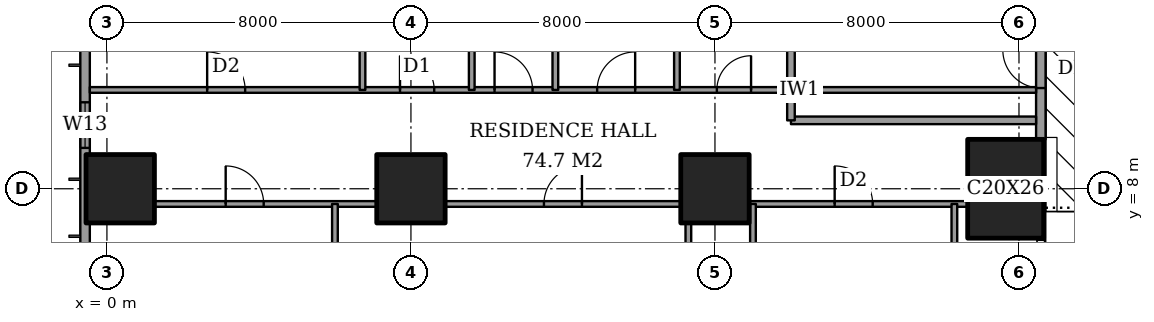
"""IFC4 building model, lengths in metres.
Left out: names, types, materials, properties, quantities, classifications, styles, units other than length and angle.
Written with IfcOpenShell. Run it as: python <this file> out.ifc"""

import sys

from ifc_helpers import new_model, si_unit, direction, frame, frame_2d, origin, origin_2d, place, context, subcontext, project, spatial, rectangle, extrude, element, fill, save


model = new_model("IFC4")
c1 = context("Model", 3, precision=1e-05, world=origin(), true_north=direction((0.0, 1.0)))
c2 = subcontext(c1, "Body", "Model", "MODEL_VIEW")
j1 = project(units=[si_unit("LENGTHUNIT", "METRE"), si_unit("PLANEANGLEUNIT", "RADIAN")], contexts=[c1])
p1 = place(None, origin())
s1 = spatial("IfcSite", under=j1, at=p1, CompositionType="ELEMENT")
p2 = place(p1, origin())
s2 = spatial("IfcBuilding", under=s1, at=p2, CompositionType="ELEMENT")
p3 = place(p2, frame((0.0, 0.0, 182.2)))
s3 = spatial("IfcBuildingStorey", under=s2, at=p3, CompositionType="ELEMENT", Elevation=182.2)
for number, where, z_axis, x_axis in (
    (1, (0.35, 8.0, 0.0), (0.0, 0.0, 1.0), (1.0, 0.0, 0.0)),
    (2, (8.0, 8.0, 0.0), (0.0, 0.0, 1.0), (1.0, 0.0, 0.0)),
    (3, (16.0, 8.0, 0.0), (0.0, 0.0, 1.0), (1.0, 0.0, 0.0)),
):
    element("IfcColumn", number, at=place(p3, frame(where, z_axis=z_axis, x_axis=x_axis)), inside=s3, PredefinedType="COLUMN", context=c2, shape_type="SweptSolid", body=[
        extrude(rectangle(XDim=1.8, YDim=1.8, at=origin_2d()), origin(), (0.0, 0.0, 1.0), 3.6),
    ])
p4 = place(p3, frame((23.65, 8.0, 0.0), z_axis=(0.0, 0.0, 1.0), x_axis=(1.0, 0.0, 0.0)))
e4 = element("IfcColumn", 4, at=p4, inside=s3, PredefinedType="COLUMN", context=c2, shape_type="SweptSolid", body=[
    extrude(rectangle(XDim=2.0, YDim=2.6, at=origin_2d()), origin(), (0.0, 0.0, 1.0), 3.6),
])
p5 = place(p3, frame((24.575, 9.3, 0.0), z_axis=(0.0, 0.0, 1.0), x_axis=(0.0, 1.0, 0.0)))
e5 = element("IfcWall", 5, at=p5, inside=s3, PredefinedType="SOLIDWALL", context=c2, shape_type="SweptSolid", body=[
    extrude(rectangle(XDim=3.7, YDim=0.25, at=frame_2d((1.85, 0.0))), origin(), (0.0, 0.0, 1.0), 3.6),
])
p6 = place(p5, frame((1.35, 0.0, 0.0)))
e6 = element("IfcOpeningElement", 6, at=p6, cuts=e5, PredefinedType="OPENING", context=c2, shape_type="SweptSolid", body=[
    extrude(rectangle(XDim=1.0, YDim=2.1, at=frame_2d((0.5, 1.05))), frame((0.0, 0.135, 0.0), z_axis=(0.0, -1.0, 0.0), x_axis=(1.0, 0.0, 0.0)), (0.0, 0.0, 1.0), 0.27),
])
p7 = place(p3, frame((-0.575, 44.825, 0.0), z_axis=(0.0, 0.0, 1.0), x_axis=(0.0, -1.0, 0.0)))
e7 = element("IfcWall", 7, at=p7, inside=s3, PredefinedType="SOLIDWALL", context=c2, shape_type="SweptSolid", body=[
    extrude(rectangle(XDim=41.65, YDim=0.25, at=frame_2d((20.825, 0.0))), origin(), (0.0, 0.0, 1.0), 3.6),
])
p8 = place(p7, frame((0.825, 0.0, 0.2)))
e8 = element("IfcOpeningElement", 8, at=p8, cuts=e7, PredefinedType="OPENING", context=c2, shape_type="SweptSolid", body=[
    extrude(rectangle(XDim=2.4, YDim=2.4, at=frame_2d((1.2, 1.2))), frame((0.0, 0.135, 0.0), z_axis=(0.0, -1.0, 0.0), x_axis=(1.0, 0.0, 0.0)), (0.0, 0.0, 1.0), 0.27),
])
p9 = place(p7, frame((6.05, 0.0, 0.2)))
e9 = element("IfcOpeningElement", 9, at=p9, cuts=e7, PredefinedType="OPENING", context=c2, shape_type="SweptSolid", body=[
    extrude(rectangle(XDim=1.2, YDim=2.4, at=frame_2d((0.6, 1.2))), frame((0.0, 0.135, 0.0), z_axis=(0.0, -1.0, 0.0), x_axis=(1.0, 0.0, 0.0)), (0.0, 0.0, 1.0), 0.27),
])
p10 = place(p7, frame((8.475, 0.0, 0.2)))
e10 = element("IfcOpeningElement", 10, at=p10, cuts=e7, PredefinedType="OPENING", context=c2, shape_type="SweptSolid", body=[
    extrude(rectangle(XDim=2.4, YDim=2.4, at=frame_2d((1.2, 1.2))), frame((0.0, 0.135, 0.0), z_axis=(0.0, -1.0, 0.0), x_axis=(1.0, 0.0, 0.0)), (0.0, 0.0, 1.0), 0.27),
])
p11 = place(p7, frame((15.625, 0.0, 0.2)))
e11 = element("IfcOpeningElement", 11, at=p11, cuts=e7, PredefinedType="OPENING", context=c2, shape_type="SweptSolid", body=[
    extrude(rectangle(XDim=2.4, YDim=2.4, at=frame_2d((1.2, 1.2))), frame((0.0, 0.135, 0.0), z_axis=(0.0, -1.0, 0.0), x_axis=(1.0, 0.0, 0.0)), (0.0, 0.0, 1.0), 0.27),
])
p12 = place(p7, frame((23.625, 0.0, 0.2)))
e12 = element("IfcOpeningElement", 12, at=p12, cuts=e7, PredefinedType="OPENING", context=c2, shape_type="SweptSolid", body=[
    extrude(rectangle(XDim=2.4, YDim=2.4, at=frame_2d((1.2, 1.2))), frame((0.0, 0.135, 0.0), z_axis=(0.0, -1.0, 0.0), x_axis=(1.0, 0.0, 0.0)), (0.0, 0.0, 1.0), 0.27),
])
p13 = place(p7, frame((30.775, 0.0, 0.2)))
e13 = element("IfcOpeningElement", 13, at=p13, cuts=e7, PredefinedType="OPENING", context=c2, shape_type="SweptSolid", body=[
    extrude(rectangle(XDim=2.4, YDim=2.4, at=frame_2d((1.2, 1.2))), frame((0.0, 0.135, 0.0), z_axis=(0.0, -1.0, 0.0), x_axis=(1.0, 0.0, 0.0)), (0.0, 0.0, 1.0), 0.27),
])
p14 = place(p7, frame((34.55, 0.0, 0.2)))
e14 = element("IfcOpeningElement", 14, at=p14, cuts=e7, PredefinedType="OPENING", context=c2, shape_type="SweptSolid", body=[
    extrude(rectangle(XDim=1.2, YDim=2.4, at=frame_2d((0.6, 1.2))), frame((0.0, 0.135, 0.0), z_axis=(0.0, -1.0, 0.0), x_axis=(1.0, 0.0, 0.0)), (0.0, 0.0, 1.0), 0.27),
])
p15 = place(p7, frame((38.425, 0.0, 0.2)))
e15 = element("IfcOpeningElement", 15, at=p15, cuts=e7, PredefinedType="OPENING", context=c2, shape_type="SweptSolid", body=[
    extrude(rectangle(XDim=2.4, YDim=2.4, at=frame_2d((1.2, 1.2))), frame((0.0, 0.135, 0.0), z_axis=(0.0, -1.0, 0.0), x_axis=(1.0, 0.0, 0.0)), (0.0, 0.0, 1.0), 0.27),
])
p16 = place(p3, frame((1.25, 7.6, 0.0), z_axis=(0.0, 0.0, 1.0), x_axis=(1.0, 0.0, 0.0)))
e16 = element("IfcWall", 16, at=p16, inside=s3, PredefinedType="PARTITIONING", context=c2, shape_type="SweptSolid", body=[
    extrude(rectangle(XDim=5.85, YDim=0.15, at=frame_2d((2.925, 0.0))), origin(), (0.0, 0.0, 1.0), 3.35),
])
p17 = place(p16, frame((1.875, 0.0, 0.0)))
e17 = element("IfcOpeningElement", 17, at=p17, cuts=e16, PredefinedType="OPENING", context=c2, shape_type="SweptSolid", body=[
    extrude(rectangle(XDim=1.0, YDim=2.1, at=frame_2d((0.5, 1.05))), frame((0.0, 0.085, 0.0), z_axis=(0.0, -1.0, 0.0), x_axis=(1.0, 0.0, 0.0)), (0.0, 0.0, 1.0), 0.17),
])
p18 = place(p3, frame((8.9, 7.6, 0.0), z_axis=(0.0, 0.0, 1.0), x_axis=(1.0, 0.0, 0.0)))
e18 = element("IfcWall", 18, at=p18, inside=s3, PredefinedType="PARTITIONING", context=c2, shape_type="SweptSolid", body=[
    extrude(rectangle(XDim=6.2, YDim=0.15, at=frame_2d((3.1, 0.0))), origin(), (0.0, 0.0, 1.0), 3.35),
])
p19 = place(p18, frame((2.6, 0.0, 0.0)))
e19 = element("IfcOpeningElement", 19, at=p19, cuts=e18, PredefinedType="OPENING", context=c2, shape_type="SweptSolid", body=[
    extrude(rectangle(XDim=1.0, YDim=2.1, at=frame_2d((0.5, 1.05))), frame((0.0, 0.085, 0.0), z_axis=(0.0, -1.0, 0.0), x_axis=(1.0, 0.0, 0.0)), (0.0, 0.0, 1.0), 0.17),
])
p20 = place(p3, frame((16.9, 7.6, 0.0), z_axis=(0.0, 0.0, 1.0), x_axis=(1.0, 0.0, 0.0)))
e20 = element("IfcWall", 20, at=p20, inside=s3, PredefinedType="PARTITIONING", context=c2, shape_type="SweptSolid", body=[
    extrude(rectangle(XDim=5.75, YDim=0.15, at=frame_2d((2.875, 0.0))), origin(), (0.0, 0.0, 1.0), 3.35),
])
p21 = place(p20, frame((2.25, 0.0, 0.0)))
e21 = element("IfcOpeningElement", 21, at=p21, cuts=e20, PredefinedType="OPENING", context=c2, shape_type="SweptSolid", body=[
    extrude(rectangle(XDim=1.0, YDim=2.1, at=frame_2d((0.5, 1.05))), frame((0.0, 0.085, 0.0), z_axis=(0.0, -1.0, 0.0), x_axis=(1.0, 0.0, 0.0)), (0.0, 0.0, 1.0), 0.17),
])
p22 = place(p3, frame((18.0, 9.8, 0.0), z_axis=(0.0, 0.0, 1.0), x_axis=(1.0, 0.0, 0.0)))
e22 = element("IfcWall", 22, at=p22, inside=s3, PredefinedType="PARTITIONING", context=c2, shape_type="SweptSolid", body=[
    extrude(rectangle(XDim=6.45, YDim=0.2, at=frame_2d((3.225, 0.0))), origin(), (0.0, 0.0, 1.0), 3.35),
])
p23 = place(p3, frame((-0.45, 10.6, 0.0), z_axis=(0.0, 0.0, 1.0), x_axis=(1.0, 0.0, 0.0)))
e23 = element("IfcWall", 23, at=p23, inside=s3, PredefinedType="PARTITIONING", context=c2, shape_type="SweptSolid", body=[
    extrude(rectangle(XDim=24.9, YDim=0.15, at=frame_2d((12.45, 0.0))), origin(), (0.0, 0.0, 1.0), 3.35),
])
p24 = place(p23, frame((10.65, 0.0, 0.0)))
e24 = element("IfcOpeningElement", 24, at=p24, cuts=e23, PredefinedType="OPENING", context=c2, shape_type="SweptSolid", body=[
    extrude(rectangle(XDim=1.0, YDim=2.1, at=frame_2d((0.5, 1.05))), frame((0.0, 0.085, 0.0), z_axis=(0.0, -1.0, 0.0), x_axis=(1.0, 0.0, 0.0)), (0.0, 0.0, 1.0), 0.17),
])
p25 = place(p23, frame((3.087, 0.0, 0.0)))
e25 = element("IfcOpeningElement", 25, at=p25, cuts=e23, PredefinedType="OPENING", context=c2, shape_type="SweptSolid", body=[
    extrude(rectangle(XDim=1.0, YDim=2.1, at=frame_2d((0.5, 1.05))), frame((0.0, 0.085, 0.0), z_axis=(0.0, -1.0, 0.0), x_axis=(1.0, 0.0, 0.0)), (0.0, 0.0, 1.0), 0.17),
])
p26 = place(p23, frame((8.163, 0.0, 0.0)))
e26 = element("IfcOpeningElement", 26, at=p26, cuts=e23, PredefinedType="OPENING", context=c2, shape_type="SweptSolid", body=[
    extrude(rectangle(XDim=0.9, YDim=2.1, at=frame_2d((0.45, 1.05))), frame((0.0, 0.085, 0.0), z_axis=(0.0, -1.0, 0.0), x_axis=(1.0, 0.0, 0.0)), (0.0, 0.0, 1.0), 0.17),
])
p27 = place(p23, frame((13.35, 0.0, 0.0)))
e27 = element("IfcOpeningElement", 27, at=p27, cuts=e23, PredefinedType="OPENING", context=c2, shape_type="SweptSolid", body=[
    extrude(rectangle(XDim=1.0, YDim=2.1, at=frame_2d((0.5, 1.05))), frame((0.0, 0.085, 0.0), z_axis=(0.0, -1.0, 0.0), x_axis=(1.0, 0.0, 0.0)), (0.0, 0.0, 1.0), 0.17),
])
p28 = place(p23, frame((16.5, 0.0, 0.0)))
e28 = element("IfcOpeningElement", 28, at=p28, cuts=e23, PredefinedType="OPENING", context=c2, shape_type="SweptSolid", body=[
    extrude(rectangle(XDim=0.9, YDim=2.1, at=frame_2d((0.45, 1.05))), frame((0.0, 0.085, 0.0), z_axis=(0.0, -1.0, 0.0), x_axis=(1.0, 0.0, 0.0)), (0.0, 0.0, 1.0), 0.17),
])
p29 = place(p3, frame((6.0, -0.45, 0.0), z_axis=(0.0, 0.0, 1.0), x_axis=(0.0, 1.0, 0.0)))
e29 = element("IfcWall", 29, at=p29, inside=s3, PredefinedType="PARTITIONING", context=c2, shape_type="SweptSolid", body=[
    extrude(rectangle(XDim=8.05, YDim=0.15, at=frame_2d((4.025, 0.0))), origin(), (0.0, 0.0, 1.0), 3.35),
])
p30 = place(p3, frame((6.725, 10.6, 0.0), z_axis=(0.0, 0.0, 1.0), x_axis=(0.0, 1.0, 0.0)))
e30 = element("IfcWall", 30, at=p30, inside=s3, PredefinedType="PARTITIONING", context=c2, shape_type="SweptSolid", body=[
    extrude(rectangle(XDim=4.2, YDim=0.15, at=frame_2d((2.1, 0.0))), origin(), (0.0, 0.0, 1.0), 3.35),
])
p31 = place(p3, frame((9.6, 10.6, 0.0), z_axis=(0.0, 0.0, 1.0), x_axis=(0.0, 1.0, 0.0)))
e31 = element("IfcWall", 31, at=p31, inside=s3, PredefinedType="PARTITIONING", context=c2, shape_type="SweptSolid", body=[
    extrude(rectangle(XDim=11.0, YDim=0.15, at=frame_2d((5.5, 0.0))), origin(), (0.0, 0.0, 1.0), 3.35),
])
p32 = place(p31, frame((8.7, 0.0, 0.0)))
e32 = element("IfcOpeningElement", 32, at=p32, cuts=e31, PredefinedType="OPENING", context=c2, shape_type="SweptSolid", body=[
    extrude(rectangle(XDim=1.0, YDim=2.1, at=frame_2d((0.5, 1.05))), frame((0.0, 0.085, 0.0), z_axis=(0.0, -1.0, 0.0), x_axis=(1.0, 0.0, 0.0)), (0.0, 0.0, 1.0), 0.17),
])
p33 = place(p3, frame((11.8, 10.6, 0.0), z_axis=(0.0, 0.0, 1.0), x_axis=(0.0, 1.0, 0.0)))
e33 = element("IfcWall", 33, at=p33, inside=s3, PredefinedType="PARTITIONING", context=c2, shape_type="SweptSolid", body=[
    extrude(rectangle(XDim=7.4, YDim=0.15, at=frame_2d((3.7, 0.0))), origin(), (0.0, 0.0, 1.0), 3.35),
])
p34 = place(p3, frame((15.0, 10.6, 0.0), z_axis=(0.0, 0.0, 1.0), x_axis=(0.0, 1.0, 0.0)))
e34 = element("IfcWall", 34, at=p34, inside=s3, PredefinedType="PARTITIONING", context=c2, shape_type="SweptSolid", body=[
    extrude(rectangle(XDim=4.2, YDim=0.15, at=frame_2d((2.1, 0.0))), origin(), (0.0, 0.0, 1.0), 3.35),
])
p35 = place(p3, frame((15.3, 1.25, 0.0), z_axis=(0.0, 0.0, 1.0), x_axis=(0.0, 1.0, 0.0)))
e35 = element("IfcWall", 35, at=p35, inside=s3, PredefinedType="PARTITIONING", context=c2, shape_type="SweptSolid", body=[
    extrude(rectangle(XDim=5.85, YDim=0.15, at=frame_2d((2.925, 0.0))), origin(), (0.0, 0.0, 1.0), 3.35),
])
p36 = place(p35, frame((2.475, 0.0, 0.0)))
e36 = element("IfcOpeningElement", 36, at=p36, cuts=e35, PredefinedType="OPENING", context=c2, shape_type="SweptSolid", body=[
    extrude(rectangle(XDim=0.9, YDim=2.1, at=frame_2d((0.45, 1.05))), frame((0.0, 0.085, 0.0), z_axis=(0.0, -1.0, 0.0), x_axis=(1.0, 0.0, 0.0)), (0.0, 0.0, 1.0), 0.17),
])
p37 = place(p3, frame((17.0, -0.45, 0.0), z_axis=(0.0, 0.0, 1.0), x_axis=(0.0, 1.0, 0.0)))
e37 = element("IfcWall", 37, at=p37, inside=s3, PredefinedType="PARTITIONING", context=c2, shape_type="SweptSolid", body=[
    extrude(rectangle(XDim=8.05, YDim=0.15, at=frame_2d((4.025, 0.0))), origin(), (0.0, 0.0, 1.0), 3.35),
])
p38 = place(p3, frame((18.0, 9.8, 0.0), z_axis=(0.0, 0.0, 1.0), x_axis=(0.0, 1.0, 0.0)))
e38 = element("IfcWall", 38, at=p38, inside=s3, PredefinedType="PARTITIONING", context=c2, shape_type="SweptSolid", body=[
    extrude(rectangle(XDim=14.2, YDim=0.2, at=frame_2d((7.1, 0.0))), origin(), (0.0, 0.0, 1.0), 3.35),
])
p39 = place(p38, frame((11.6, 0.0, 0.0)))
e39 = element("IfcOpeningElement", 39, at=p39, cuts=e38, PredefinedType="OPENING", context=c2, shape_type="SweptSolid", body=[
    extrude(rectangle(XDim=1.2, YDim=2.4, at=frame_2d((0.6, 1.2))), frame((0.0, 0.11, 0.0), z_axis=(0.0, -1.0, 0.0), x_axis=(1.0, 0.0, 0.0)), (0.0, 0.0, 1.0), 0.22),
])
p40 = place(p3, frame((22.3, -0.45, 0.0), z_axis=(0.0, 0.0, 1.0), x_axis=(0.0, 1.0, 0.0)))
e40 = element("IfcWall", 40, at=p40, inside=s3, PredefinedType="PARTITIONING", context=c2, shape_type="SweptSolid", body=[
    extrude(rectangle(XDim=8.05, YDim=0.15, at=frame_2d((4.025, 0.0))), origin(), (0.0, 0.0, 1.0), 3.35),
])
p41 = place(p40, frame((3.575, 0.0, 0.0)))
e41 = element("IfcOpeningElement", 41, at=p41, cuts=e40, PredefinedType="OPENING", context=c2, shape_type="SweptSolid", body=[
    extrude(rectangle(XDim=0.9, YDim=2.1, at=frame_2d((0.45, 1.05))), frame((0.0, 0.085, 0.0), z_axis=(0.0, -1.0, 0.0), x_axis=(1.0, 0.0, 0.0)), (0.0, 0.0, 1.0), 0.17),
])
p42 = place(p6, origin())
e42 = element("IfcDoor", 42, at=p42, inside=s3, OperationType="SINGLE_SWING_LEFT", PredefinedType="DOOR", context=c2, shape_type="SweptSolid", body=[
    extrude(rectangle(XDim=1.0, YDim=2.1, at=frame_2d((0.5, 1.05))), frame((0.0, 0.025, 0.0), z_axis=(0.0, -1.0, 0.0), x_axis=(1.0, 0.0, 0.0)), (0.0, 0.0, 1.0), 0.05),
])
fill(e6, e42)
p43 = place(p14, origin())
e43 = element("IfcWindow", 43, at=p43, inside=s3, PartitioningType="SINGLE_PANEL", PredefinedType="WINDOW", context=c2, shape_type="SweptSolid", body=[
    extrude(rectangle(XDim=1.2, YDim=2.4, at=frame_2d((0.6, 1.2))), frame((0.0, 0.03, 0.0), z_axis=(0.0, -1.0, 0.0), x_axis=(1.0, 0.0, 0.0)), (0.0, 0.0, 1.0), 0.06),
])
fill(e14, e43)
p44 = place(p17, origin())
e44 = element("IfcDoor", 44, at=p44, inside=s3, OperationType="SINGLE_SWING_RIGHT", PredefinedType="DOOR", context=c2, shape_type="SweptSolid", body=[
    extrude(rectangle(XDim=1.0, YDim=2.1, at=frame_2d((0.5, 1.05))), frame((0.0, 0.025, 0.0), z_axis=(0.0, -1.0, 0.0), x_axis=(1.0, 0.0, 0.0)), (0.0, 0.0, 1.0), 0.05),
])
fill(e17, e44)
p45 = place(p19, origin())
e45 = element("IfcDoor", 45, at=p45, inside=s3, OperationType="SINGLE_SWING_LEFT", PredefinedType="DOOR", context=c2, shape_type="SweptSolid", body=[
    extrude(rectangle(XDim=1.0, YDim=2.1, at=frame_2d((0.5, 1.05))), frame((0.0, 0.025, 0.0), z_axis=(0.0, -1.0, 0.0), x_axis=(1.0, 0.0, 0.0)), (0.0, 0.0, 1.0), 0.05),
])
fill(e19, e45)
p46 = place(p21, origin())
e46 = element("IfcDoor", 46, at=p46, inside=s3, OperationType="SINGLE_SWING_RIGHT", PredefinedType="DOOR", context=c2, shape_type="SweptSolid", body=[
    extrude(rectangle(XDim=1.0, YDim=2.1, at=frame_2d((0.5, 1.05))), frame((0.0, 0.025, 0.0), z_axis=(0.0, -1.0, 0.0), x_axis=(1.0, 0.0, 0.0)), (0.0, 0.0, 1.0), 0.05),
])
fill(e21, e46)
p47 = place(p24, origin())
e47 = element("IfcDoor", 47, at=p47, inside=s3, OperationType="SINGLE_SWING_RIGHT", PredefinedType="DOOR", context=c2, shape_type="SweptSolid", body=[
    extrude(rectangle(XDim=1.0, YDim=2.1, at=frame_2d((0.5, 1.05))), frame((0.0, 0.025, 0.0), z_axis=(0.0, -1.0, 0.0), x_axis=(1.0, 0.0, 0.0)), (0.0, 0.0, 1.0), 0.05),
])
fill(e24, e47)
p48 = place(p25, origin())
e48 = element("IfcDoor", 48, at=p48, inside=s3, OperationType="SINGLE_SWING_RIGHT", PredefinedType="DOOR", context=c2, shape_type="SweptSolid", body=[
    extrude(rectangle(XDim=1.0, YDim=2.1, at=frame_2d((0.5, 1.05))), frame((0.0, 0.025, 0.0), z_axis=(0.0, -1.0, 0.0), x_axis=(1.0, 0.0, 0.0)), (0.0, 0.0, 1.0), 0.05),
])
fill(e25, e48)
p49 = place(p26, origin())
e49 = element("IfcDoor", 49, at=p49, inside=s3, OperationType="SINGLE_SWING_RIGHT", PredefinedType="DOOR", context=c2, shape_type="SweptSolid", body=[
    extrude(rectangle(XDim=0.9, YDim=2.1, at=frame_2d((0.45, 1.05))), frame((0.0, 0.025, 0.0), z_axis=(0.0, -1.0, 0.0), x_axis=(1.0, 0.0, 0.0)), (0.0, 0.0, 1.0), 0.05),
])
fill(e26, e49)
p50 = place(p27, origin())
e50 = element("IfcDoor", 50, at=p50, inside=s3, OperationType="SINGLE_SWING_LEFT", PredefinedType="DOOR", context=c2, shape_type="SweptSolid", body=[
    extrude(rectangle(XDim=1.0, YDim=2.1, at=frame_2d((0.5, 1.05))), frame((0.0, 0.025, 0.0), z_axis=(0.0, -1.0, 0.0), x_axis=(1.0, 0.0, 0.0)), (0.0, 0.0, 1.0), 0.05),
])
fill(e27, e50)
p51 = place(p28, origin())
e51 = element("IfcDoor", 51, at=p51, inside=s3, OperationType="SINGLE_SWING_LEFT", PredefinedType="DOOR", context=c2, shape_type="SweptSolid", body=[
    extrude(rectangle(XDim=0.9, YDim=2.1, at=frame_2d((0.45, 1.05))), frame((0.0, 0.025, 0.0), z_axis=(0.0, -1.0, 0.0), x_axis=(1.0, 0.0, 0.0)), (0.0, 0.0, 1.0), 0.05),
])
fill(e28, e51)
save(model, sys.argv[1])
